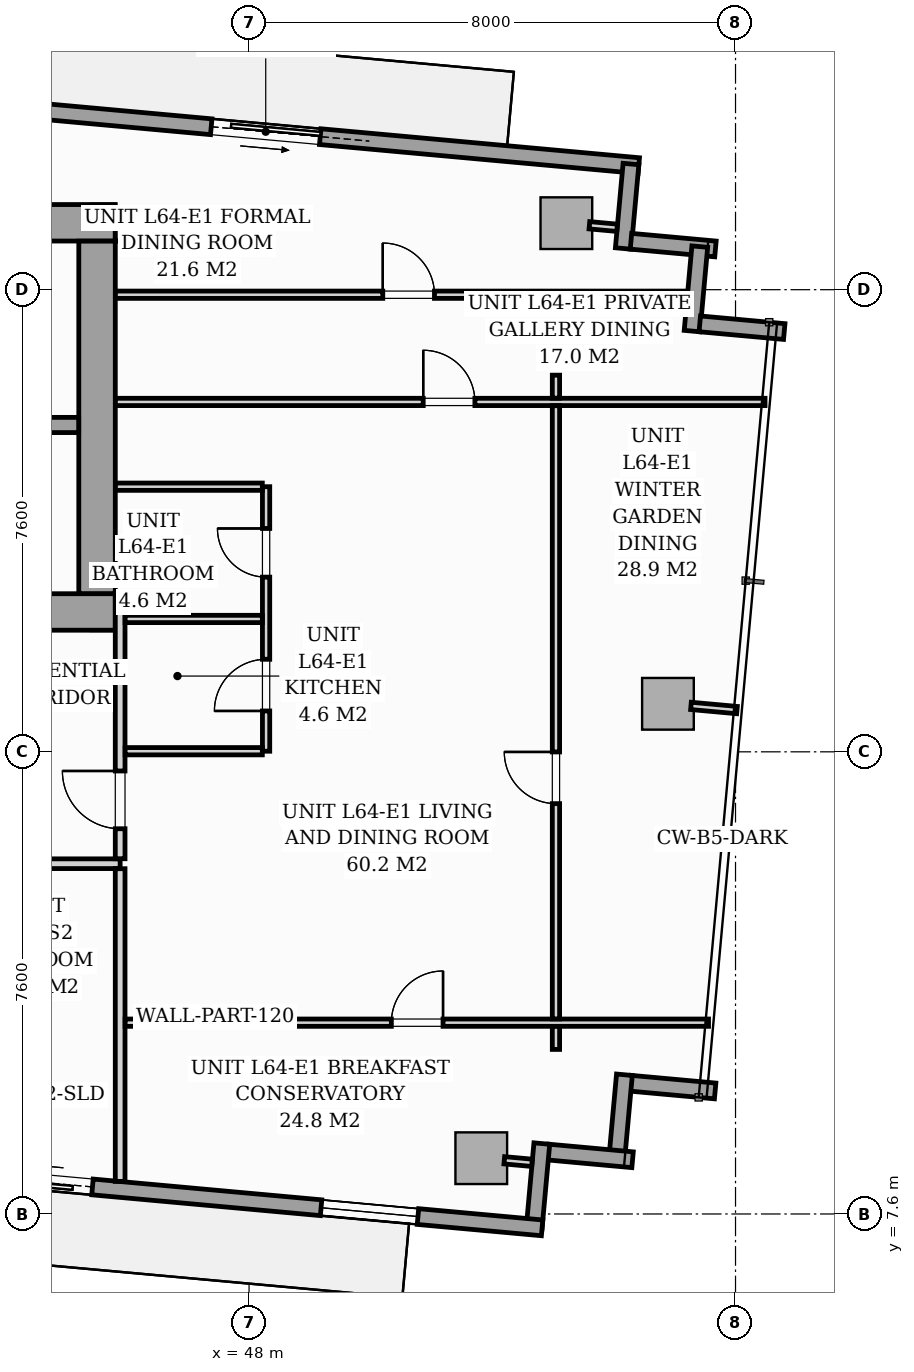
"""IFC4 building model, lengths in metres.
Left out: names, types, materials, properties, quantities, classifications, styles, units other than length and angle.
Written with IfcOpenShell. Run it as: python <this file> out.ifc"""

import sys

from ifc_helpers import new_model, si_unit, direction, frame, frame_2d, origin, origin_2d, place, context, subcontext, project, spatial, rectangle, i_section, extrude, source, transform, mapped, element, fill, save


model = new_model("IFC4")
c1 = context("Model", 3, precision=1e-05, world=origin(), true_north=direction((0.0, 1.0)))
c2 = subcontext(c1, "Body", "Model", "MODEL_VIEW")
j1 = project(units=[si_unit("LENGTHUNIT", "METRE"), si_unit("PLANEANGLEUNIT", "RADIAN")], contexts=[c1])
p1 = place(None, origin())
s1 = spatial("IfcSite", under=j1, at=p1, CompositionType="ELEMENT")
p2 = place(p1, origin())
s2 = spatial("IfcBuilding", under=s1, at=p2, CompositionType="ELEMENT")
p3 = place(p2, frame((0.0, 0.0, 223.2)))
s3 = spatial("IfcBuildingStorey", under=s2, at=p3, CompositionType="ELEMENT", Elevation=223.2)
m1 = source(origin(), c2, "Body", "SweptSolid", [
    extrude(i_section(OverallWidth=0.409, OverallDepth=0.425, WebThickness=0.033, FlangeThickness=0.052, FilletRadius=0.018, at=origin_2d()), origin(), (0.0, 0.0, 1.0), 3.296),
])
for number, where, z_axis, x_axis in (
    (1, (45.6, 17.4, 0.002), (0.0, 0.0, 1.0), (1.0, 0.0, 0.0)),
    (2, (45.6, 24.0, 0.002), (0.0, 0.0, 1.0), (1.0, 0.0, 0.0)),
):
    element("IfcColumn", number, at=place(p3, frame(where, z_axis=z_axis, x_axis=x_axis)), inside=s3, PredefinedType="PILASTER", context=c2, shape_type="MappedRepresentation", body=[
        mapped(m1, transform((0.0, 0.0, 0.0), scale=1.0)),
    ])
m2 = source(origin(), c2, "Body", "SweptSolid", [
    extrude(rectangle(XDim=0.85, YDim=0.85, at=origin_2d()), origin(), (0.0, 0.0, 1.0), 3.296),
])
for number, where, z_axis, x_axis in (
    (3, (51.819, 8.517, 0.002), (0.0, 0.0, 1.0), (0.996, -0.091, 0.0)),
    (4, (53.218, 23.894, 0.002), (0.0, 0.0, 1.0), (0.996, -0.091, 0.0)),
    (5, (54.889, 15.99, 0.002), (0.0, 0.0, 1.0), (0.996, -0.091, 0.0)),
):
    element("IfcColumn", number, at=place(p3, frame(where, z_axis=z_axis, x_axis=x_axis)), inside=s3, PredefinedType="COLUMN", context=c2, shape_type="MappedRepresentation", body=[
        mapped(m2, transform((0.0, 0.0, 0.0), scale=1.0)),
    ])
p4 = place(p3, frame((39.839, 26.166, 0.0), z_axis=(0.0, 0.0, 1.0), x_axis=(0.995884447498, -0.090632043071, 0.0)))
e6 = element("IfcWall", 6, at=p4, inside=s3, PredefinedType="STANDARD", context=c2, shape_type="SweptSolid", body=[
    extrude(rectangle(XDim=14.63, YDim=0.26, at=frame_2d((7.315, 0.0))), origin(), (0.0, 0.0, 1.0), 3.04),
])
p5 = place(p4, frame((7.57, 0.0, 0.0)))
e7 = element("IfcOpeningElement", 7, at=p5, cuts=e6, PredefinedType="OPENING", context=c2, shape_type="SweptSolid", body=[
    extrude(rectangle(XDim=1.8, YDim=2.06, at=frame_2d((0.9, 1.03))), frame((0.0, 0.14, 0.0), z_axis=(0.0, -1.0, 0.0), x_axis=(1.0, 0.0, 0.0)), (0.0, 0.0, 1.0), 0.28),
])
p6 = place(p4, frame((0.7, 0.0, 0.65)))
e8 = element("IfcOpeningElement", 8, at=p6, cuts=e6, PredefinedType="OPENING", context=c2, shape_type="SweptSolid", body=[
    extrude(rectangle(XDim=1.6, YDim=1.5, at=frame_2d((0.8, 0.75))), frame((0.0, 0.14, 0.0), z_axis=(0.0, -1.0, 0.0), x_axis=(1.0, 0.0, 0.0)), (0.0, 0.0, 1.0), 0.28),
])
p7 = place(p3, frame((54.281, 24.866, 0.0), z_axis=(0.0, 0.0, 1.0), x_axis=(-0.090661991521, -0.995881721538, 0.0)))
e9 = element("IfcWall", 9, at=p7, inside=s3, PredefinedType="STANDARD", context=c2, shape_type="SweptSolid", body=[
    extrude(rectangle(XDim=1.395, YDim=0.26, at=frame_2d((0.698, 0.0))), origin(), (0.0, 0.0, 1.0), 3.04),
])
for number, where, z_axis, x_axis in (
    (10, (54.281, 23.596, 0.0), (0.0, 0.0, 1.0), (0.996, -0.091, 0.0)),
    (11, (55.412, 23.508, 0.0), (0.0, 0.0, 1.0), (-0.091, -0.996, 0.0)),
    (12, (55.412, 22.238, 0.0), (0.0, 0.0, 1.0), (0.996, -0.091, 0.0)),
):
    element("IfcWall", number, at=place(p3, frame(where, z_axis=z_axis, x_axis=x_axis)), inside=s3, PredefinedType="STANDARD", context=c2, shape_type="SweptSolid", body=[
        extrude(rectangle(XDim=1.395, YDim=0.26, at=frame_2d((0.698, 0.0))), origin(), (0.0, 0.0, 1.0), 3.04),
    ])
for number, where, z_axis, x_axis in (
    (13, (55.665, 9.623, 0.0), (0.0, 0.0, 1.0), (-0.996, 0.091, 0.0)),
    (14, (54.173, 9.889, 0.0), (0.0, 0.0, 1.0), (-0.091, -0.996, 0.0)),
):
    element("IfcWall", number, at=place(p3, frame(where, z_axis=z_axis, x_axis=x_axis)), inside=s3, PredefinedType="STANDARD", context=c2, shape_type="SweptSolid", body=[
        extrude(rectangle(XDim=1.395, YDim=0.26, at=frame_2d((0.698, 0.0))), origin(), (0.0, 0.0, 1.0), 3.04),
    ])
for number, where, z_axis, x_axis in (
    (15, (54.307, 8.492, 0.0), (0.0, 0.0, 1.0), (-0.996, 0.091, 0.0)),
    (16, (52.815, 8.758, 0.0), (0.0, 0.0, 1.0), (-0.091, -0.996, 0.0)),
):
    element("IfcWall", number, at=place(p3, frame(where, z_axis=z_axis, x_axis=x_axis)), inside=s3, PredefinedType="STANDARD", context=c2, shape_type="SweptSolid", body=[
        extrude(rectangle(XDim=1.395, YDim=0.26, at=frame_2d((0.698, 0.0))), origin(), (0.0, 0.0, 1.0), 3.04),
    ])
p8 = place(p3, frame((52.819, 7.372, 0.0), z_axis=(0.0, 0.0, 1.0), x_axis=(-0.995884447498, 0.090632043071, 0.0)))
e17 = element("IfcWall", 17, at=p8, inside=s3, PredefinedType="STANDARD", context=c2, shape_type="SweptSolid", body=[
    extrude(rectangle(XDim=14.63, YDim=0.26, at=frame_2d((7.315, 0.0))), origin(), (0.0, 0.0, 1.0), 3.04),
])
p9 = place(p8, frame((7.425, 0.0, 0.0)))
e18 = element("IfcOpeningElement", 18, at=p9, cuts=e17, PredefinedType="OPENING", context=c2, shape_type="SweptSolid", body=[
    extrude(rectangle(XDim=1.8, YDim=2.06, at=frame_2d((0.9, 1.03))), frame((0.0, 0.14, 0.0), z_axis=(0.0, -1.0, 0.0), x_axis=(1.0, 0.0, 0.0)), (0.0, 0.0, 1.0), 0.28),
])
p10 = place(p8, frame((2.05, 0.0, 0.65)))
e19 = element("IfcOpeningElement", 19, at=p10, cuts=e17, PredefinedType="OPENING", context=c2, shape_type="SweptSolid", body=[
    extrude(rectangle(XDim=1.6, YDim=1.5, at=frame_2d((0.8, 0.75))), frame((0.0, 0.14, 0.0), z_axis=(0.0, -1.0, 0.0), x_axis=(1.0, 0.0, 0.0)), (0.0, 0.0, 1.0), 0.28),
])
p11 = place(p3, frame((26.2, 17.5, 0.0), z_axis=(0.0, 0.0, 1.0), x_axis=(1.0, 0.0, 0.0)))
e20 = element("IfcWall", 20, at=p11, inside=s3, PredefinedType="SHEAR", context=c2, shape_type="SweptSolid", body=[
    extrude(rectangle(XDim=19.6, YDim=0.6, at=frame_2d((9.8, 0.0))), origin(), (0.0, 0.0, 1.0), 3.3),
])
p12 = place(p11, frame((0.95, 0.0, 0.0)))
e21 = element("IfcOpeningElement", 21, at=p12, cuts=e20, PredefinedType="OPENING", context=c2, shape_type="SweptSolid", body=[
    extrude(rectangle(XDim=0.95, YDim=2.06, at=frame_2d((0.475, 1.03))), frame((0.0, 0.31, 0.0), z_axis=(0.0, -1.0, 0.0), x_axis=(1.0, 0.0, 0.0)), (0.0, 0.0, 1.0), 0.62),
])
p13 = place(p11, frame((9.38, 0.0, 0.0)))
e22 = element("IfcOpeningElement", 22, at=p13, cuts=e20, PredefinedType="OPENING", context=c2, shape_type="SweptSolid", body=[
    extrude(rectangle(XDim=0.85, YDim=2.0, at=frame_2d((0.425, 1.0))), frame((0.0, 0.31, 0.0), z_axis=(0.0, -1.0, 0.0), x_axis=(1.0, 0.0, 0.0)), (0.0, 0.0, 1.0), 0.62),
])
p14 = place(p11, frame((17.55, 0.0, 0.0)))
e23 = element("IfcOpeningElement", 23, at=p14, cuts=e20, PredefinedType="OPENING", context=c2, shape_type="SweptSolid", body=[
    extrude(rectangle(XDim=0.95, YDim=2.06, at=frame_2d((0.475, 1.03))), frame((0.0, 0.31, 0.0), z_axis=(0.0, -1.0, 0.0), x_axis=(1.0, 0.0, 0.0)), (0.0, 0.0, 1.0), 0.62),
])
p15 = place(p3, frame((26.2, 23.9, 0.0), z_axis=(0.0, 0.0, 1.0), x_axis=(1.0, 0.0, 0.0)))
e24 = element("IfcWall", 24, at=p15, inside=s3, PredefinedType="SHEAR", context=c2, shape_type="SweptSolid", body=[
    extrude(rectangle(XDim=19.6, YDim=0.6, at=frame_2d((9.8, 0.0))), origin(), (0.0, 0.0, 1.0), 3.3),
])
p16 = place(p3, frame((45.5, 17.802, 0.0), z_axis=(0.0, 0.0, 1.0), x_axis=(0.0, 1.0, 0.0)))
e25 = element("IfcWall", 25, at=p16, inside=s3, PredefinedType="SHEAR", context=c2, shape_type="SweptSolid", body=[
    extrude(rectangle(XDim=5.796, YDim=0.6, at=frame_2d((2.898, 0.0))), origin(), (0.0, 0.0, 1.0), 3.3),
])
p17 = place(p3, frame((37.05, 20.575, 0.0), z_axis=(0.0, 0.0, 1.0), x_axis=(1.0, 0.0, 0.0)))
e26 = element("IfcWall", 26, at=p17, inside=s3, PredefinedType="SOLIDWALL", context=c2, shape_type="SweptSolid", body=[
    extrude(rectangle(XDim=8.148, YDim=0.25, at=frame_2d((4.074, 0.0))), origin(), (0.0, 0.0, 1.0), 3.3),
])
p18 = place(p17, frame((6.6, 0.0, 0.0)))
e27 = element("IfcOpeningElement", 27, at=p18, cuts=e26, PredefinedType="OPENING", context=c2, shape_type="SweptSolid", body=[
    extrude(rectangle(XDim=0.95, YDim=2.06, at=frame_2d((0.475, 1.03))), frame((0.0, 0.135, 0.0), z_axis=(0.0, -1.0, 0.0), x_axis=(1.0, 0.0, 0.0)), (0.0, 0.0, 1.0), 0.27),
])
p19 = place(p3, frame((24.55, 13.36, 0.0), z_axis=(0.0, 0.0, 1.0), x_axis=(1.0, 0.0, 0.0)))
e28 = element("IfcWall", 28, at=p19, inside=s3, PredefinedType="PARTITIONING", context=c2, shape_type="SweptSolid", body=[
    extrude(rectangle(XDim=21.33, YDim=0.16, at=frame_2d((10.665, 0.0))), origin(), (0.0, 0.0, 1.0), 2.596),
])
p20 = place(p19, frame((2.37, 0.0, 0.0)))
e29 = element("IfcOpeningElement", 29, at=p20, cuts=e28, PredefinedType="OPENING", context=c2, shape_type="SweptSolid", body=[
    extrude(rectangle(XDim=0.95, YDim=2.06, at=frame_2d((0.475, 1.03))), frame((0.0, 0.09, 0.0), z_axis=(0.0, -1.0, 0.0), x_axis=(1.0, 0.0, 0.0)), (0.0, 0.0, 1.0), 0.18),
])
p21 = place(p19, frame((13.707, 0.0, 0.0)))
e30 = element("IfcOpeningElement", 30, at=p21, cuts=e28, PredefinedType="OPENING", context=c2, shape_type="SweptSolid", body=[
    extrude(rectangle(XDim=0.95, YDim=2.06, at=frame_2d((0.475, 1.03))), frame((0.0, 0.09, 0.0), z_axis=(0.0, -1.0, 0.0), x_axis=(1.0, 0.0, 0.0)), (0.0, 0.0, 1.0), 0.18),
])
p22 = place(p3, frame((45.88, 8.136, 0.0), z_axis=(0.0, 0.0, 1.0), x_axis=(0.0, 1.0, 0.0)))
e31 = element("IfcWall", 31, at=p22, inside=s3, PredefinedType="PARTITIONING", context=c2, shape_type="SweptSolid", body=[
    extrude(rectangle(XDim=5.142, YDim=0.16, at=frame_2d((2.571, 0.0))), origin(), (0.0, 0.0, 1.0), 3.04),
])
p23 = place(p3, frame((45.88, 13.442, 0.0), z_axis=(0.0, 0.0, 1.0), x_axis=(0.0, 1.0, 0.0)))
e32 = element("IfcWall", 32, at=p23, inside=s3, PredefinedType="PARTITIONING", context=c2, shape_type="SweptSolid", body=[
    extrude(rectangle(XDim=4.36, YDim=0.16, at=frame_2d((2.18, 0.0))), origin(), (0.0, 0.0, 1.0), 3.04),
])
p24 = place(p23, frame((0.493, 0.0, 0.0)))
e33 = element("IfcOpeningElement", 33, at=p24, cuts=e32, PredefinedType="OPENING", context=c2, shape_type="SweptSolid", body=[
    extrude(rectangle(XDim=0.95, YDim=2.06, at=frame_2d((0.475, 1.03))), frame((0.0, 0.09, 0.0), z_axis=(0.0, -1.0, 0.0), x_axis=(1.0, 0.0, 0.0)), (0.0, 0.0, 1.0), 0.18),
])
p25 = place(p3, frame((45.88, 23.598, 0.0), z_axis=(0.0, 0.0, 1.0), x_axis=(0.0, 1.0, 0.0)))
e34 = element("IfcWall", 34, at=p25, inside=s3, PredefinedType="PARTITIONING", context=c2, shape_type="SweptSolid", body=[
    extrude(rectangle(XDim=0.452, YDim=0.16, at=frame_2d((0.226, 0.0))), origin(), (0.0, 0.0, 1.0), 3.04),
])
p26 = place(p3, frame((48.28, 15.21, 0.0), z_axis=(0.0, 0.0, 1.0), x_axis=(0.0, 1.0, 0.0)))
e35 = element("IfcWall", 35, at=p26, inside=s3, PredefinedType="PARTITIONING", context=c2, shape_type="SweptSolid", body=[
    extrude(rectangle(XDim=4.35, YDim=0.12, at=frame_2d((2.175, 0.0))), origin(), (0.0, 0.0, 1.0), 3.04),
])
p27 = place(p26, frame((0.662, 0.0, 0.0)))
e36 = element("IfcOpeningElement", 36, at=p27, cuts=e35, PredefinedType="OPENING", context=c2, shape_type="SweptSolid", body=[
    extrude(rectangle(XDim=0.85, YDim=2.05, at=frame_2d((0.425, 1.025))), frame((0.0, 0.07, 0.0), z_axis=(0.0, -1.0, 0.0), x_axis=(1.0, 0.0, 0.0)), (0.0, 0.0, 1.0), 0.14),
])
p28 = place(p26, frame((2.863, 0.0, 0.0)))
e37 = element("IfcOpeningElement", 37, at=p28, cuts=e35, PredefinedType="OPENING", context=c2, shape_type="SweptSolid", body=[
    extrude(rectangle(XDim=0.8, YDim=2.02, at=frame_2d((0.4, 1.01))), frame((0.0, 0.07, 0.0), z_axis=(0.0, -1.0, 0.0), x_axis=(1.0, 0.0, 0.0)), (0.0, 0.0, 1.0), 0.14),
])
p29 = place(p3, frame((45.962, 17.385, 0.0), z_axis=(0.0, 0.0, 1.0), x_axis=(1.0, 0.0, 0.0)))
e38 = element("IfcWall", 38, at=p29, inside=s3, PredefinedType="PARTITIONING", context=c2, shape_type="SweptSolid", body=[
    extrude(rectangle(XDim=2.256, YDim=0.12, at=frame_2d((1.128, 0.0))), origin(), (0.0, 0.0, 1.0), 2.381),
])
p30 = place(p3, frame((45.962, 15.21, 0.0), z_axis=(0.0, 0.0, 1.0), x_axis=(1.0, 0.0, 0.0)))
e39 = element("IfcWall", 39, at=p30, inside=s3, PredefinedType="PARTITIONING", context=c2, shape_type="SweptSolid", body=[
    extrude(rectangle(XDim=2.256, YDim=0.12, at=frame_2d((1.128, 0.0))), origin(), (0.0, 0.0, 1.0), 3.04),
])
p31 = place(p3, frame((45.802, 19.56, 0.0), z_axis=(0.0, 0.0, 1.0), x_axis=(1.0, 0.0, 0.0)))
e40 = element("IfcWall", 40, at=p31, inside=s3, PredefinedType="PARTITIONING", context=c2, shape_type="SweptSolid", body=[
    extrude(rectangle(XDim=2.416, YDim=0.12, at=frame_2d((1.208, 0.0))), origin(), (0.0, 0.0, 1.0), 3.04),
])
p32 = place(p3, frame((45.802, 22.717, 0.0), z_axis=(0.0, 0.0, 1.0), x_axis=(1.0, 0.0, 0.0)))
e41 = element("IfcWall", 41, at=p32, inside=s3, PredefinedType="PARTITIONING", context=c2, shape_type="SweptSolid", body=[
    extrude(rectangle(XDim=9.406, YDim=0.12, at=frame_2d((4.703, 0.0))), origin(), (0.0, 0.0, 1.0), 3.04),
])
p33 = place(p32, frame((4.397, 0.0, 0.0)))
e42 = element("IfcOpeningElement", 42, at=p33, cuts=e41, PredefinedType="OPENING", context=c2, shape_type="SweptSolid", body=[
    extrude(rectangle(XDim=0.85, YDim=2.05, at=frame_2d((0.425, 1.025))), frame((0.0, 0.07, 0.0), z_axis=(0.0, -1.0, 0.0), x_axis=(1.0, 0.0, 0.0)), (0.0, 0.0, 1.0), 0.14),
])
p34 = place(p3, frame((45.962, 10.746, 0.0), z_axis=(0.0, 0.0, 1.0), x_axis=(1.0, 0.0, 0.0)))
e43 = element("IfcWall", 43, at=p34, inside=s3, PredefinedType="PARTITIONING", context=c2, shape_type="SweptSolid", body=[
    extrude(rectangle(XDim=9.594, YDim=0.12, at=frame_2d((4.797, 0.0))), origin(), (0.0, 0.0, 1.0), 3.04),
])
p35 = place(p34, frame((4.378, 0.0, 0.0)))
e44 = element("IfcOpeningElement", 44, at=p35, cuts=e43, PredefinedType="OPENING", context=c2, shape_type="SweptSolid", body=[
    extrude(rectangle(XDim=0.85, YDim=2.05, at=frame_2d((0.425, 1.025))), frame((0.0, 0.07, 0.0), z_axis=(0.0, -1.0, 0.0), x_axis=(1.0, 0.0, 0.0)), (0.0, 0.0, 1.0), 0.14),
])
p36 = place(p3, frame((45.802, 20.954, 0.0), z_axis=(0.0, 0.0, 1.0), x_axis=(1.0, 0.0, 0.0)))
e45 = element("IfcWall", 45, at=p36, inside=s3, PredefinedType="PARTITIONING", context=c2, shape_type="SweptSolid", body=[
    extrude(rectangle(XDim=10.683, YDim=0.12, at=frame_2d((5.342, 0.0))), origin(), (0.0, 0.0, 1.0), 3.04),
])
p37 = place(p36, frame((5.062, 0.0, 0.0)))
e46 = element("IfcOpeningElement", 46, at=p37, cuts=e45, PredefinedType="OPENING", context=c2, shape_type="SweptSolid", body=[
    extrude(rectangle(XDim=0.85, YDim=2.05, at=frame_2d((0.425, 1.025))), frame((0.0, 0.07, 0.0), z_axis=(0.0, -1.0, 0.0), x_axis=(1.0, 0.0, 0.0)), (0.0, 0.0, 1.0), 0.14),
])
p38 = place(p3, frame((53.047, 10.306, 0.0), z_axis=(0.0, 0.0, 1.0), x_axis=(0.0, 1.0, 0.0)))
e47 = element("IfcWall", 47, at=p38, inside=s3, PredefinedType="PARTITIONING", context=c2, shape_type="SweptSolid", body=[
    extrude(rectangle(XDim=0.378, YDim=0.12, at=frame_2d((0.189, 0.0))), origin(), (0.0, 0.0, 1.0), 3.04),
])
p39 = place(p3, frame((53.047, 10.808, 0.0), z_axis=(0.0, 0.0, 1.0), x_axis=(0.0, 1.0, 0.0)))
e48 = element("IfcWall", 48, at=p39, inside=s3, PredefinedType="PARTITIONING", context=c2, shape_type="SweptSolid", body=[
    extrude(rectangle(XDim=10.084, YDim=0.12, at=frame_2d((5.042, 0.0))), origin(), (0.0, 0.0, 1.0), 3.04),
])
p40 = place(p39, frame((3.54, 0.0, 0.0)))
e49 = element("IfcOpeningElement", 49, at=p40, cuts=e48, PredefinedType="OPENING", context=c2, shape_type="SweptSolid", body=[
    extrude(rectangle(XDim=0.85, YDim=2.05, at=frame_2d((0.425, 1.025))), frame((0.0, 0.07, 0.0), z_axis=(0.0, -1.0, 0.0), x_axis=(1.0, 0.0, 0.0)), (0.0, 0.0, 1.0), 0.14),
])
p41 = place(p3, frame((53.047, 21.016, 0.0), z_axis=(0.0, 0.0, 1.0), x_axis=(0.0, 1.0, 0.0)))
e50 = element("IfcWall", 50, at=p41, inside=s3, PredefinedType="PARTITIONING", context=c2, shape_type="SweptSolid", body=[
    extrude(rectangle(XDim=0.378, YDim=0.12, at=frame_2d((0.189, 0.0))), origin(), (0.0, 0.0, 1.0), 3.04),
])
for number, where, z_axis, x_axis in (
    (51, (52.197, 8.483, 0.0), (0.0, 0.0, 1.0), (0.996, -0.091, 0.0)),
    (52, (53.597, 23.859, 0.0), (0.0, 0.0, 1.0), (0.996, -0.091, 0.0)),
):
    element("IfcWall", number, at=place(p3, frame(where, z_axis=z_axis, x_axis=x_axis)), inside=s3, PredefinedType="PARTITIONING", context=c2, shape_type="SweptSolid", body=[
        extrude(rectangle(XDim=0.458, YDim=0.12, at=frame_2d((0.229, 0.0))), origin(), (0.0, 0.0, 1.0), 3.04),
    ])
p42 = place(p3, frame((55.267, 15.955, 0.0), z_axis=(0.0, 0.0, 1.0), x_axis=(0.995887938321, -0.09059367697, 0.0)))
e53 = element("IfcWall", 53, at=p42, inside=s3, PredefinedType="PARTITIONING", context=c2, shape_type="SweptSolid", body=[
    extrude(rectangle(XDim=0.76, YDim=0.12, at=frame_2d((0.38, 0.0))), origin(), (0.0, 0.0, 1.0), 3.04),
])
m3 = source(origin(), c2, "Body", "SweptSolid", [
    extrude(rectangle(XDim=1.8, YDim=2.06, at=frame_2d((0.9, 1.03))), frame((0.0, 0.025, 0.0), z_axis=(0.0, -1.0, 0.0), x_axis=(1.0, 0.0, 0.0)), (0.0, 0.0, 1.0), 0.05),
])
p43 = place(p5, origin())
e54 = element("IfcDoor", 54, at=p43, inside=s3, OperationType="SLIDING_TO_RIGHT", PredefinedType="DOOR", context=c2, shape_type="MappedRepresentation", body=[
    mapped(m3, transform((0.0, 0.0, 0.0), scale=1.0)),
])
fill(e7, e54)
p44 = place(p9, origin())
e55 = element("IfcDoor", 55, at=p44, inside=s3, OperationType="SLIDING_TO_RIGHT", PredefinedType="DOOR", context=c2, shape_type="MappedRepresentation", body=[
    mapped(m3, transform((0.0, 0.0, 0.0), scale=1.0)),
])
fill(e18, e55)
m4 = source(origin(), c2, "Body", "SweptSolid", [
    extrude(rectangle(XDim=1.6, YDim=1.5, at=frame_2d((0.8, 0.75))), frame((0.0, 0.03, 0.0), z_axis=(0.0, -1.0, 0.0), x_axis=(1.0, 0.0, 0.0)), (0.0, 0.0, 1.0), 0.06),
])
p45 = place(p10, origin())
e56 = element("IfcWindow", 56, at=p45, inside=s3, PartitioningType="SINGLE_PANEL", PredefinedType="WINDOW", context=c2, shape_type="MappedRepresentation", body=[
    mapped(m4, transform((0.0, 0.0, 0.0), scale=1.0)),
])
fill(e19, e56)
m5 = source(origin(), c2, "Body", "SweptSolid", [
    extrude(rectangle(XDim=0.95, YDim=2.06, at=frame_2d((0.475, 1.03))), frame((0.0, 0.025, 0.0), z_axis=(0.0, -1.0, 0.0), x_axis=(1.0, 0.0, 0.0)), (0.0, 0.0, 1.0), 0.05),
])
p46 = place(p24, origin())
e57 = element("IfcDoor", 57, at=p46, inside=s3, OperationType="SINGLE_SWING_RIGHT", PredefinedType="DOOR", context=c2, shape_type="MappedRepresentation", body=[
    mapped(m5, transform((0.0, 0.0, 0.0), scale=1.0)),
])
fill(e33, e57)
m6 = source(origin(), c2, "Body", "SweptSolid", [
    extrude(rectangle(XDim=0.85, YDim=2.05, at=frame_2d((0.425, 1.025))), frame((0.0, 0.025, 0.0), z_axis=(0.0, -1.0, 0.0), x_axis=(1.0, 0.0, 0.0)), (0.0, 0.0, 1.0), 0.05),
])
p47 = place(p27, origin())
e58 = element("IfcDoor", 58, at=p47, inside=s3, OperationType="SINGLE_SWING_LEFT", PredefinedType="DOOR", context=c2, shape_type="MappedRepresentation", body=[
    mapped(m6, transform((0.0, 0.0, 0.0), scale=1.0)),
])
fill(e36, e58)
m7 = source(origin(), c2, "Body", "SweptSolid", [
    extrude(rectangle(XDim=0.8, YDim=2.02, at=frame_2d((0.4, 1.01))), frame((0.0, 0.025, 0.0), z_axis=(0.0, -1.0, 0.0), x_axis=(1.0, 0.0, 0.0)), (0.0, 0.0, 1.0), 0.05),
])
p48 = place(p28, origin())
e59 = element("IfcDoor", 59, at=p48, inside=s3, OperationType="SINGLE_SWING_RIGHT", PredefinedType="DOOR", context=c2, shape_type="MappedRepresentation", body=[
    mapped(m7, transform((0.0, 0.0, 0.0), scale=1.0)),
])
fill(e37, e59)
p49 = place(p33, origin())
e60 = element("IfcDoor", 60, at=p49, inside=s3, OperationType="SINGLE_SWING_LEFT", PredefinedType="DOOR", context=c2, shape_type="MappedRepresentation", body=[
    mapped(m6, transform((0.0, 0.0, 0.0), scale=1.0)),
])
fill(e42, e60)
p50 = place(p35, origin())
e61 = element("IfcDoor", 61, at=p50, inside=s3, OperationType="SINGLE_SWING_RIGHT", PredefinedType="DOOR", context=c2, shape_type="MappedRepresentation", body=[
    mapped(m6, transform((0.0, 0.0, 0.0), scale=1.0)),
])
fill(e44, e61)
p51 = place(p37, origin())
e62 = element("IfcDoor", 62, at=p51, inside=s3, OperationType="SINGLE_SWING_LEFT", PredefinedType="DOOR", context=c2, shape_type="MappedRepresentation", body=[
    mapped(m6, transform((0.0, 0.0, 0.0), scale=1.0)),
])
fill(e46, e62)
p52 = place(p40, origin())
e63 = element("IfcDoor", 63, at=p52, inside=s3, OperationType="SINGLE_SWING_RIGHT", PredefinedType="DOOR", context=c2, shape_type="MappedRepresentation", body=[
    mapped(m6, transform((0.0, 0.0, 0.0), scale=1.0)),
])
fill(e49, e63)
save(model, sys.argv[1])
